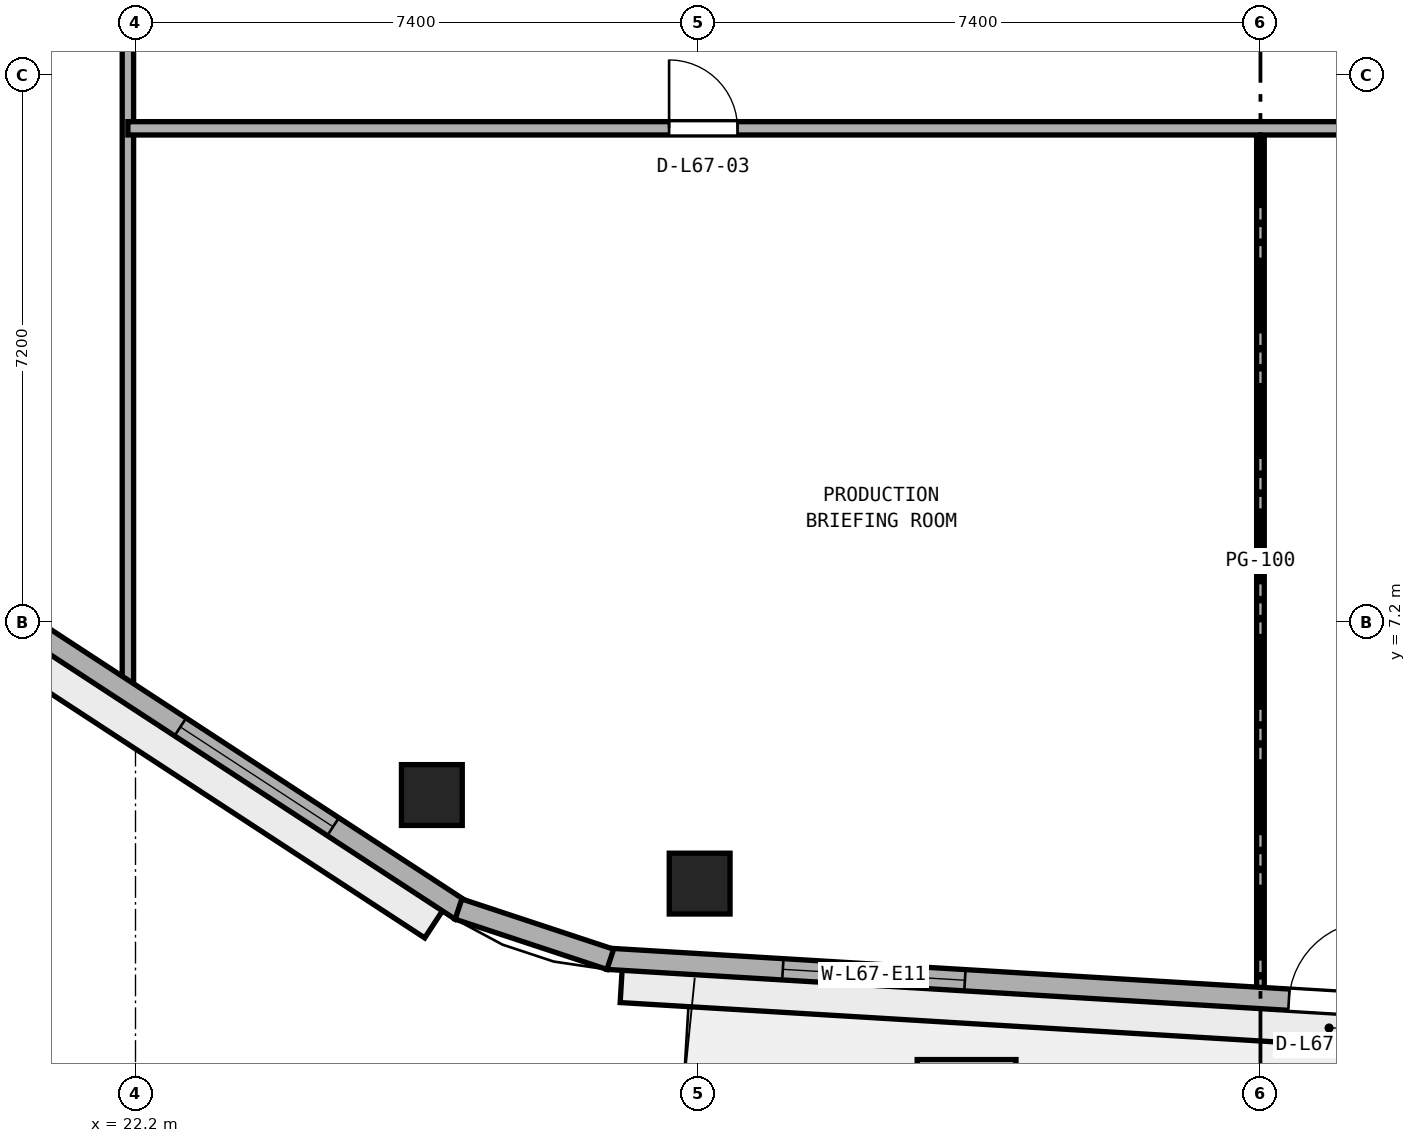
"""IFC4 building model, lengths in metres.
Left out: names, types, materials, properties, quantities, classifications, styles, units other than length and angle.
Written with IfcOpenShell. Run it as: python <this file> out.ifc"""

import sys

from ifc_helpers import new_model, si_unit, direction, frame, frame_2d, origin, origin_2d, place, context, subcontext, project, spatial, rectangle, extrude, element, fill, save


model = new_model("IFC4")
c1 = context("Model", 3, precision=1e-05, world=origin(), true_north=direction((0.0, 1.0)))
c2 = subcontext(c1, "Body", "Model", "MODEL_VIEW")
j1 = project(units=[si_unit("LENGTHUNIT", "METRE"), si_unit("PLANEANGLEUNIT", "RADIAN")], contexts=[c1])
p1 = place(None, origin())
s1 = spatial("IfcSite", under=j1, at=p1, CompositionType="ELEMENT")
p2 = place(p1, origin())
s2 = spatial("IfcBuilding", under=s1, at=p2, CompositionType="ELEMENT")
p3 = place(p2, frame((0.0, 0.0, 263.0)))
s3 = spatial("IfcBuildingStorey", under=s2, at=p3, CompositionType="ELEMENT", Elevation=263.0)
for number, where, z_axis, x_axis in (
    (1, (29.622, 3.764, 0.0), (0.0, 0.0, 1.0), (1.0, 0.0, 0.0)),
    (2, (26.099, 4.929, 0.0), (0.0, 0.0, 1.0), (1.0, 0.0, 0.0)),
):
    element("IfcColumn", number, at=place(p3, frame(where, z_axis=z_axis, x_axis=x_axis)), inside=s3, PredefinedType="COLUMN", context=c2, shape_type="SweptSolid", body=[
        extrude(rectangle(XDim=0.8, YDim=0.8, at=origin_2d()), origin(), (0.0, 0.0, 1.0), 3.8),
    ])
p4 = place(p3, frame((37.0, 2.323, 0.0), z_axis=(0.0, 0.0, 1.0), x_axis=(0.0, 1.0, 0.0)))
e3 = element("IfcWall", 3, at=p4, inside=s3, PredefinedType="PARTITIONING", context=c2, shape_type="SweptSolid", body=[
    extrude(rectangle(XDim=11.376, YDim=0.1, at=frame_2d((5.688, 0.0))), origin(), (0.0, 0.0, 1.0), 3.51),
])
p5 = place(p3, frame((22.1, 6.248, 0.0), z_axis=(0.0, 0.0, 1.0), x_axis=(0.0, 1.0, 0.0)))
e4 = element("IfcWall", 4, at=p5, inside=s3, PredefinedType="PARTITIONING", context=c2, shape_type="SweptSolid", body=[
    extrude(rectangle(XDim=30.452, YDim=0.15, at=frame_2d((15.226, 0.0))), origin(), (0.0, 0.0, 1.0), 3.51),
])
p6 = place(p5, frame((11.252, 0.0, 0.0)))
e5 = element("IfcOpeningElement", 5, at=p6, cuts=e4, PredefinedType="OPENING", context=c2, shape_type="SweptSolid", body=[
    extrude(rectangle(XDim=0.9, YDim=2.1, at=frame_2d((0.45, 1.05))), frame((0.0, 0.085, 0.0), z_axis=(0.0, -1.0, 0.0), x_axis=(1.0, 0.0, 0.0)), (0.0, 0.0, 1.0), 0.17),
])
p7 = place(p5, frame((21.077, 0.0, 0.0)))
e6 = element("IfcOpeningElement", 6, at=p7, cuts=e4, PredefinedType="OPENING", context=c2, shape_type="SweptSolid", body=[
    extrude(rectangle(XDim=0.9, YDim=2.1, at=frame_2d((0.45, 1.05))), frame((0.0, 0.085, 0.0), z_axis=(0.0, -1.0, 0.0), x_axis=(1.0, 0.0, 0.0)), (0.0, 0.0, 1.0), 0.17),
])
p8 = place(p3, frame((22.1, 13.7, 0.0), z_axis=(0.0, 0.0, 1.0), x_axis=(1.0, 0.0, 0.0)))
e7 = element("IfcWall", 7, at=p8, inside=s3, PredefinedType="PARTITIONING", context=c2, shape_type="SweptSolid", body=[
    extrude(rectangle(XDim=26.5, YDim=0.175, at=frame_2d((13.25, 0.0))), origin(), (0.0, 0.0, 1.0), 3.51),
])
p9 = place(p8, frame((7.12, 0.0, 0.0)))
e8 = element("IfcOpeningElement", 8, at=p9, cuts=e7, PredefinedType="OPENING", context=c2, shape_type="SweptSolid", body=[
    extrude(rectangle(XDim=0.9, YDim=2.1, at=frame_2d((0.45, 1.05))), frame((0.0, 0.097, 0.0), z_axis=(0.0, -1.0, 0.0), x_axis=(1.0, 0.0, 0.0)), (0.0, 0.0, 1.0), 0.195),
])
p10 = place(p8, frame((20.13, 0.0, 0.0)))
e9 = element("IfcOpeningElement", 9, at=p10, cuts=e7, PredefinedType="OPENING", context=c2, shape_type="SweptSolid", body=[
    extrude(rectangle(XDim=0.9, YDim=2.1, at=frame_2d((0.45, 1.05))), frame((0.0, 0.097, 0.0), z_axis=(0.0, -1.0, 0.0), x_axis=(1.0, 0.0, 0.0)), (0.0, 0.0, 1.0), 0.195),
])
p11 = place(p3, frame((28.411, 2.774, 0.0), z_axis=(0.0, 0.0, 1.0), x_axis=(0.998203068368, -0.059921901676, 0.0)))
e10 = element("IfcWall", 10, at=p11, inside=s3, PredefinedType="STANDARD", context=c2, shape_type="SweptSolid", body=[
    extrude(rectangle(XDim=19.06, YDim=0.28, at=frame_2d((9.53, 0.0))), origin(), (0.0, 0.0, 1.0), 3.51),
])
p12 = place(p11, frame((8.98, 0.0, 0.0)))
e11 = element("IfcOpeningElement", 11, at=p12, cuts=e10, PredefinedType="OPENING", context=c2, shape_type="SweptSolid", body=[
    extrude(rectangle(XDim=1.1, YDim=2.2, at=frame_2d((0.55, 1.1))), frame((0.0, 0.15, 0.0), z_axis=(0.0, -1.0, 0.0), x_axis=(1.0, 0.0, 0.0)), (0.0, 0.0, 1.0), 0.3),
])
p13 = place(p11, frame((2.31, 0.0, 0.9)))
e12 = element("IfcOpeningElement", 12, at=p13, cuts=e10, PredefinedType="OPENING", context=c2, shape_type="SweptSolid", body=[
    extrude(rectangle(XDim=2.4, YDim=1.75, at=frame_2d((1.2, 0.875))), frame((0.0, 0.15, 0.0), z_axis=(0.0, -1.0, 0.0), x_axis=(1.0, 0.0, 0.0)), (0.0, 0.0, 1.0), 0.3),
])
p14 = place(p11, frame((14.35, 0.0, 0.9)))
e13 = element("IfcOpeningElement", 13, at=p14, cuts=e10, PredefinedType="OPENING", context=c2, shape_type="SweptSolid", body=[
    extrude(rectangle(XDim=2.4, YDim=1.75, at=frame_2d((1.2, 0.875))), frame((0.0, 0.15, 0.0), z_axis=(0.0, -1.0, 0.0), x_axis=(1.0, 0.0, 0.0)), (0.0, 0.0, 1.0), 0.3),
])
p15 = place(p3, frame((12.034, 12.854, 0.0), z_axis=(0.0, 0.0, 1.0), x_axis=(0.837118352984, -0.547021812269, 0.0)))
e14 = element("IfcWall", 14, at=p15, inside=s3, PredefinedType="STANDARD", context=c2, shape_type="SweptSolid", body=[
    extrude(rectangle(XDim=17.259, YDim=0.28, at=frame_2d((8.63, 0.0))), origin(), (0.0, 0.0, 1.0), 3.51),
])
p16 = place(p15, frame((2.01, 0.0, 0.9)))
e15 = element("IfcOpeningElement", 15, at=p16, cuts=e14, PredefinedType="OPENING", context=c2, shape_type="SweptSolid", body=[
    extrude(rectangle(XDim=2.4, YDim=1.75, at=frame_2d((1.2, 0.875))), frame((0.0, 0.15, 0.0), z_axis=(0.0, -1.0, 0.0), x_axis=(1.0, 0.0, 0.0)), (0.0, 0.0, 1.0), 0.3),
])
p17 = place(p15, frame((7.43, 0.0, 0.9)))
e16 = element("IfcOpeningElement", 16, at=p17, cuts=e14, PredefinedType="OPENING", context=c2, shape_type="SweptSolid", body=[
    extrude(rectangle(XDim=2.4, YDim=1.75, at=frame_2d((1.2, 0.875))), frame((0.0, 0.15, 0.0), z_axis=(0.0, -1.0, 0.0), x_axis=(1.0, 0.0, 0.0)), (0.0, 0.0, 1.0), 0.3),
])
p18 = place(p15, frame((12.849, 0.0, 0.9)))
e17 = element("IfcOpeningElement", 17, at=p18, cuts=e14, PredefinedType="OPENING", context=c2, shape_type="SweptSolid", body=[
    extrude(rectangle(XDim=2.4, YDim=1.75, at=frame_2d((1.2, 0.875))), frame((0.0, 0.15, 0.0), z_axis=(0.0, -1.0, 0.0), x_axis=(1.0, 0.0, 0.0)), (0.0, 0.0, 1.0), 0.3),
])
p19 = place(p3, frame((26.449, 3.428, 0.0), z_axis=(0.0, 0.0, 1.0), x_axis=(0.949435039229, -0.313963542923, 0.0)))
e18 = element("IfcWall", 18, at=p19, inside=s3, PredefinedType="STANDARD", context=c2, shape_type="SweptSolid", body=[
    extrude(rectangle(XDim=2.104, YDim=0.28, at=frame_2d((1.052, 0.0))), origin(), (0.0, 0.0, 1.0), 3.51),
])
p20 = place(p9, origin())
e19 = element("IfcDoor", 19, at=p20, inside=s3, OperationType="SINGLE_SWING_LEFT", PredefinedType="DOOR", context=c2, shape_type="SweptSolid", body=[
    extrude(rectangle(XDim=0.9, YDim=2.1, at=frame_2d((0.45, 1.05))), frame((0.0, 0.025, 0.0), z_axis=(0.0, -1.0, 0.0), x_axis=(1.0, 0.0, 0.0)), (0.0, 0.0, 1.0), 0.05),
])
fill(e8, e19)
p21 = place(p12, origin())
e20 = element("IfcDoor", 20, at=p21, inside=s3, OperationType="SINGLE_SWING_RIGHT", PredefinedType="DOOR", context=c2, shape_type="SweptSolid", body=[
    extrude(rectangle(XDim=1.1, YDim=2.2, at=frame_2d((0.55, 1.1))), frame((0.0, 0.025, 0.0), z_axis=(0.0, -1.0, 0.0), x_axis=(1.0, 0.0, 0.0)), (0.0, 0.0, 1.0), 0.05),
])
fill(e11, e20)
p22 = place(p13, origin())
e21 = element("IfcWindow", 21, at=p22, inside=s3, PartitioningType="SINGLE_PANEL", PredefinedType="WINDOW", context=c2, shape_type="SweptSolid", body=[
    extrude(rectangle(XDim=2.4, YDim=1.75, at=frame_2d((1.2, 0.875))), frame((0.0, 0.03, 0.0), z_axis=(0.0, -1.0, 0.0), x_axis=(1.0, 0.0, 0.0)), (0.0, 0.0, 1.0), 0.06),
])
fill(e12, e21)
p23 = place(p18, origin())
e22 = element("IfcWindow", 22, at=p23, inside=s3, PartitioningType="SINGLE_PANEL", PredefinedType="WINDOW", context=c2, shape_type="SweptSolid", body=[
    extrude(rectangle(XDim=2.4, YDim=1.75, at=frame_2d((1.2, 0.875))), frame((0.0, 0.03, 0.0), z_axis=(0.0, -1.0, 0.0), x_axis=(1.0, 0.0, 0.0)), (0.0, 0.0, 1.0), 0.06),
])
fill(e17, e22)
save(model, sys.argv[1])
